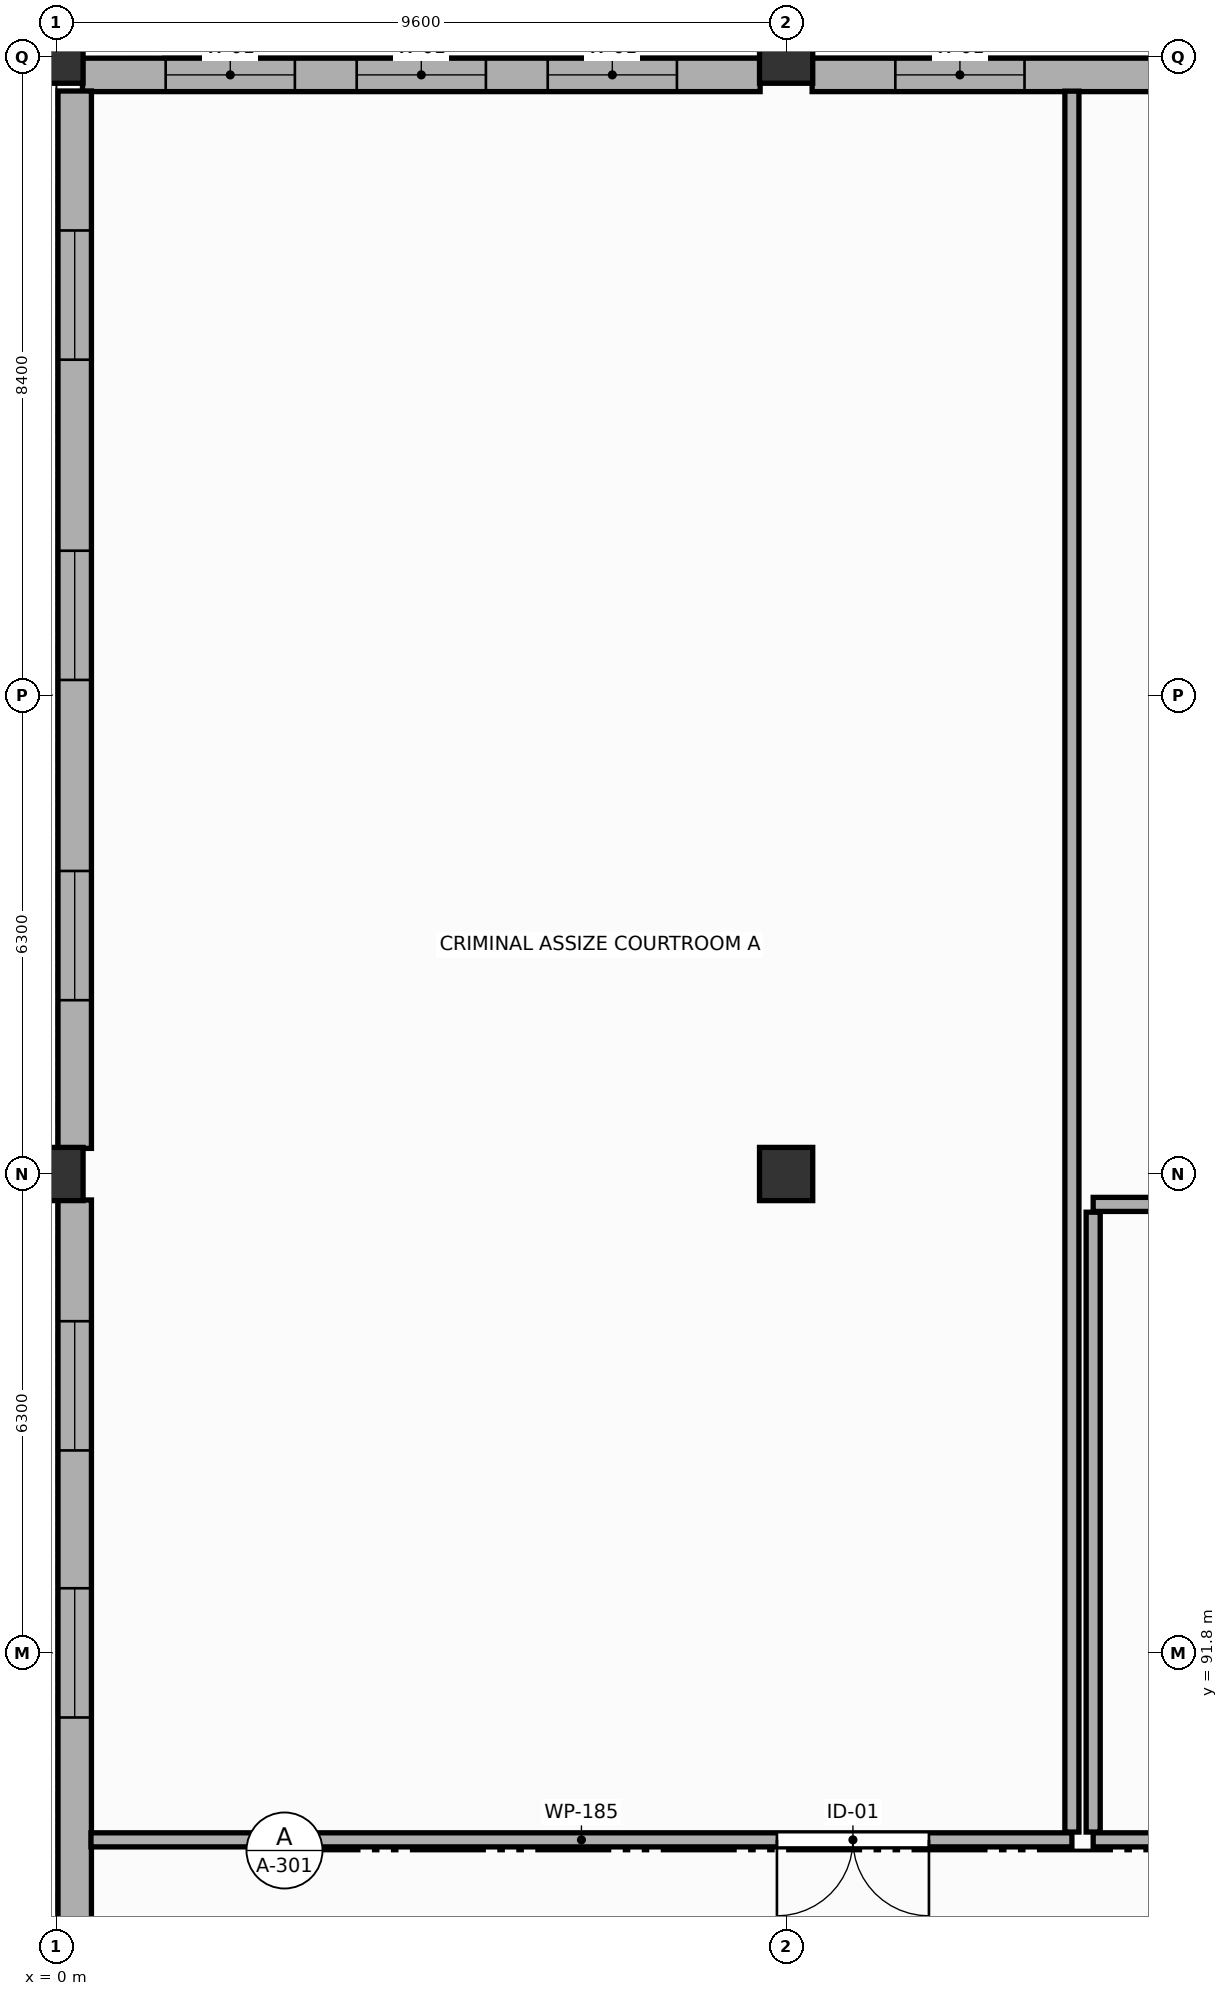
"""IFC4 building model, lengths in metres.
Left out: names, types, materials, properties, quantities, classifications, styles, units other than length and angle.
Written with IfcOpenShell. Run it as: python <this file> out.ifc"""

import sys

from ifc_helpers import new_model, si_unit, direction, frame, frame_2d, origin, origin_2d, place, context, subcontext, project, spatial, rectangle, extrude, element, fill, save


model = new_model("IFC4")
c1 = context("Model", 3, precision=1e-05, world=origin(), true_north=direction((0.0, 1.0)))
c2 = subcontext(c1, "Body", "Model", "MODEL_VIEW")
j1 = project(units=[si_unit("LENGTHUNIT", "METRE"), si_unit("PLANEANGLEUNIT", "RADIAN")], contexts=[c1])
p1 = place(None, origin())
s1 = spatial("IfcSite", under=j1, at=p1, CompositionType="ELEMENT")
p2 = place(p1, origin())
s2 = spatial("IfcBuilding", under=s1, at=p2, CompositionType="ELEMENT")
p3 = place(p2, frame((0.0, 0.0, 9.9)))
s3 = spatial("IfcBuildingStorey", under=s2, at=p3, CompositionType="ELEMENT", Elevation=9.9)
for number, where, z_axis, x_axis in (
    (1, (0.0, 98.1, 0.0), (0.0, 0.0, 1.0), (1.0, 0.0, 0.0)),
    (2, (0.0, 112.8, 0.0), (0.0, 0.0, 1.0), (1.0, 0.0, 0.0)),
    (3, (9.6, 98.1, 0.0), (0.0, 0.0, 1.0), (1.0, 0.0, 0.0)),
    (4, (9.6, 112.8, 0.0), (0.0, 0.0, 1.0), (1.0, 0.0, 0.0)),
):
    element("IfcColumn", number, at=place(p3, frame(where, z_axis=z_axis, x_axis=x_axis)), inside=s3, PredefinedType="COLUMN", context=c2, shape_type="SweptSolid", body=[
        extrude(rectangle(XDim=0.7, YDim=0.7, at=origin_2d()), origin(), (0.0, 0.0, 1.0), 4.5),
    ])
p4 = place(p3, frame((0.342, 112.56, 0.0), z_axis=(0.0, 0.0, 1.0), x_axis=(1.0, 0.0, 0.0)))
e5 = element("IfcWall", 5, at=p4, inside=s3, PredefinedType="STANDARD", context=c2, shape_type="SweptSolid", body=[
    extrude(rectangle(XDim=8.916, YDim=0.44, at=frame_2d((4.458, 0.0))), origin(), (0.0, 0.0, 1.0), 3.33),
])
p5 = place(p4, frame((1.095, 0.0, 0.85)))
e6 = element("IfcOpeningElement", 6, at=p5, cuts=e5, PredefinedType="OPENING", context=c2, shape_type="SweptSolid", body=[
    extrude(rectangle(XDim=1.7, YDim=2.3, at=frame_2d((0.85, 1.15))), frame((0.0, 0.23, 0.0), z_axis=(0.0, -1.0, 0.0), x_axis=(1.0, 0.0, 0.0)), (0.0, 0.0, 1.0), 0.46),
])
p6 = place(p4, frame((3.608, 0.0, 0.85)))
e7 = element("IfcOpeningElement", 7, at=p6, cuts=e5, PredefinedType="OPENING", context=c2, shape_type="SweptSolid", body=[
    extrude(rectangle(XDim=1.7, YDim=2.3, at=frame_2d((0.85, 1.15))), frame((0.0, 0.23, 0.0), z_axis=(0.0, -1.0, 0.0), x_axis=(1.0, 0.0, 0.0)), (0.0, 0.0, 1.0), 0.46),
])
p7 = place(p4, frame((6.121, 0.0, 0.85)))
e8 = element("IfcOpeningElement", 8, at=p7, cuts=e5, PredefinedType="OPENING", context=c2, shape_type="SweptSolid", body=[
    extrude(rectangle(XDim=1.7, YDim=2.3, at=frame_2d((0.85, 1.15))), frame((0.0, 0.23, 0.0), z_axis=(0.0, -1.0, 0.0), x_axis=(1.0, 0.0, 0.0)), (0.0, 0.0, 1.0), 0.46),
])
p8 = place(p3, frame((9.942, 112.56, 0.0), z_axis=(0.0, 0.0, 1.0), x_axis=(1.0, 0.0, 0.0)))
e9 = element("IfcWall", 9, at=p8, inside=s3, PredefinedType="STANDARD", context=c2, shape_type="SweptSolid", body=[
    extrude(rectangle(XDim=8.916, YDim=0.44, at=frame_2d((4.458, 0.0))), origin(), (0.0, 0.0, 1.0), 3.33),
])
p9 = place(p8, frame((1.095, 0.0, 0.85)))
e10 = element("IfcOpeningElement", 10, at=p9, cuts=e9, PredefinedType="OPENING", context=c2, shape_type="SweptSolid", body=[
    extrude(rectangle(XDim=1.7, YDim=2.3, at=frame_2d((0.85, 1.15))), frame((0.0, 0.23, 0.0), z_axis=(0.0, -1.0, 0.0), x_axis=(1.0, 0.0, 0.0)), (0.0, 0.0, 1.0), 0.46),
])
p10 = place(p8, frame((6.121, 0.0, 0.85)))
e11 = element("IfcOpeningElement", 11, at=p10, cuts=e9, PredefinedType="OPENING", context=c2, shape_type="SweptSolid", body=[
    extrude(rectangle(XDim=1.7, YDim=2.3, at=frame_2d((0.85, 1.15))), frame((0.0, 0.23, 0.0), z_axis=(0.0, -1.0, 0.0), x_axis=(1.0, 0.0, 0.0)), (0.0, 0.0, 1.0), 0.46),
])
p11 = place(p3, frame((0.24, 85.837, 0.0), z_axis=(0.0, 0.0, 1.0), x_axis=(0.0, 1.0, 0.0)))
e12 = element("IfcWall", 12, at=p11, inside=s3, PredefinedType="STANDARD", context=c2, shape_type="SweptSolid", body=[
    extrude(rectangle(XDim=11.921, YDim=0.44, at=frame_2d((5.96, 0.0))), origin(), (0.0, 0.0, 1.0), 3.33),
])
p12 = place(p11, frame((5.113, 0.0, 0.85)))
e13 = element("IfcOpeningElement", 13, at=p12, cuts=e12, PredefinedType="OPENING", context=c2, shape_type="SweptSolid", body=[
    extrude(rectangle(XDim=1.7, YDim=2.3, at=frame_2d((0.85, 1.15))), frame((0.0, 0.23, 0.0), z_axis=(0.0, -1.0, 0.0), x_axis=(1.0, 0.0, 0.0)), (0.0, 0.0, 1.0), 0.46),
])
p13 = place(p11, frame((8.626, 0.0, 0.85)))
e14 = element("IfcOpeningElement", 14, at=p13, cuts=e12, PredefinedType="OPENING", context=c2, shape_type="SweptSolid", body=[
    extrude(rectangle(XDim=1.7, YDim=2.3, at=frame_2d((0.85, 1.15))), frame((0.0, 0.23, 0.0), z_axis=(0.0, -1.0, 0.0), x_axis=(1.0, 0.0, 0.0)), (0.0, 0.0, 1.0), 0.46),
])
p14 = place(p3, frame((0.24, 98.437, 0.0), z_axis=(0.0, 0.0, 1.0), x_axis=(0.0, 1.0, 0.0)))
e15 = element("IfcWall", 15, at=p14, inside=s3, PredefinedType="STANDARD", context=c2, shape_type="SweptSolid", body=[
    extrude(rectangle(XDim=13.911, YDim=0.44, at=frame_2d((6.956, 0.0))), origin(), (0.0, 0.0, 1.0), 3.33),
])
p15 = place(p14, frame((1.95, 0.0, 0.85)))
e16 = element("IfcOpeningElement", 16, at=p15, cuts=e15, PredefinedType="OPENING", context=c2, shape_type="SweptSolid", body=[
    extrude(rectangle(XDim=1.7, YDim=2.3, at=frame_2d((0.85, 1.15))), frame((0.0, 0.23, 0.0), z_axis=(0.0, -1.0, 0.0), x_axis=(1.0, 0.0, 0.0)), (0.0, 0.0, 1.0), 0.46),
])
p16 = place(p14, frame((6.163, 0.0, 0.85)))
e17 = element("IfcOpeningElement", 17, at=p16, cuts=e15, PredefinedType="OPENING", context=c2, shape_type="SweptSolid", body=[
    extrude(rectangle(XDim=1.7, YDim=2.3, at=frame_2d((0.85, 1.15))), frame((0.0, 0.23, 0.0), z_axis=(0.0, -1.0, 0.0), x_axis=(1.0, 0.0, 0.0)), (0.0, 0.0, 1.0), 0.46),
])
p17 = place(p14, frame((10.376, 0.0, 0.85)))
e18 = element("IfcOpeningElement", 18, at=p17, cuts=e15, PredefinedType="OPENING", context=c2, shape_type="SweptSolid", body=[
    extrude(rectangle(XDim=1.7, YDim=2.3, at=frame_2d((0.85, 1.15))), frame((0.0, 0.23, 0.0), z_axis=(0.0, -1.0, 0.0), x_axis=(1.0, 0.0, 0.0)), (0.0, 0.0, 1.0), 0.46),
])
p18 = place(p3, frame((13.36, 89.34, 0.0), z_axis=(0.0, 0.0, 1.0), x_axis=(-1.0, 0.0, 0.0)))
e19 = element("IfcWall", 19, at=p18, inside=s3, PredefinedType="PARTITIONING", context=c2, shape_type="SweptSolid", body=[
    extrude(rectangle(XDim=12.906, YDim=0.185, at=frame_2d((6.453, 0.0))), origin(), (0.0, 0.0, 1.0), 3.38),
])
p19 = place(p18, frame((1.881, 0.0, 0.0)))
e20 = element("IfcOpeningElement", 20, at=p19, cuts=e19, PredefinedType="OPENING", context=c2, shape_type="SweptSolid", body=[
    extrude(rectangle(XDim=2.0, YDim=2.5, at=frame_2d((1.0, 1.25))), frame((0.0, 0.103, 0.0), z_axis=(0.0, -1.0, 0.0), x_axis=(1.0, 0.0, 0.0)), (0.0, 0.0, 1.0), 0.205),
])
p20 = place(p3, frame((13.36, 112.346, 0.0), z_axis=(0.0, 0.0, 1.0), x_axis=(0.0, -1.0, 0.0)))
e21 = element("IfcWall", 21, at=p20, inside=s3, PredefinedType="PARTITIONING", context=c2, shape_type="SweptSolid", body=[
    extrude(rectangle(XDim=22.904, YDim=0.185, at=frame_2d((11.452, 0.0))), origin(), (0.0, 0.0, 1.0), 3.58),
])
p21 = place(p3, frame((13.64, 97.7, 0.0), z_axis=(0.0, 0.0, 1.0), x_axis=(1.0, 0.0, 0.0)))
e22 = element("IfcWall", 22, at=p21, inside=s3, PredefinedType="PARTITIONING", context=c2, shape_type="SweptSolid", body=[
    extrude(rectangle(XDim=12.42, YDim=0.185, at=frame_2d((6.21, 0.0))), origin(), (0.0, 0.0, 1.0), 3.33),
])
p22 = place(p3, frame((26.06, 89.34, 0.0), z_axis=(0.0, 0.0, 1.0), x_axis=(-1.0, 0.0, 0.0)))
e23 = element("IfcWall", 23, at=p22, inside=s3, PredefinedType="PARTITIONING", context=c2, shape_type="SweptSolid", body=[
    extrude(rectangle(XDim=12.42, YDim=0.185, at=frame_2d((6.21, 0.0))), origin(), (0.0, 0.0, 1.0), 3.38),
])
p23 = place(p22, frame((1.808, 0.0, 0.0)))
e24 = element("IfcOpeningElement", 24, at=p23, cuts=e23, PredefinedType="OPENING", context=c2, shape_type="SweptSolid", body=[
    extrude(rectangle(XDim=2.0, YDim=2.5, at=frame_2d((1.0, 1.25))), frame((0.0, 0.103, 0.0), z_axis=(0.0, -1.0, 0.0), x_axis=(1.0, 0.0, 0.0)), (0.0, 0.0, 1.0), 0.205),
])
p24 = place(p3, frame((13.64, 89.442, 0.0), z_axis=(0.0, 0.0, 1.0), x_axis=(0.0, 1.0, 0.0)))
e25 = element("IfcWall", 25, at=p24, inside=s3, PredefinedType="PARTITIONING", context=c2, shape_type="SweptSolid", body=[
    extrude(rectangle(XDim=8.155, YDim=0.185, at=frame_2d((4.078, 0.0))), origin(), (0.0, 0.0, 1.0), 3.63),
])
p25 = place(p5, origin())
e26 = element("IfcWindow", 26, at=p25, inside=s3, PartitioningType="SINGLE_PANEL", PredefinedType="WINDOW", context=c2, shape_type="SweptSolid", body=[
    extrude(rectangle(XDim=1.7, YDim=2.3, at=frame_2d((0.85, 1.15))), frame((0.0, 0.03, 0.0), z_axis=(0.0, -1.0, 0.0), x_axis=(1.0, 0.0, 0.0)), (0.0, 0.0, 1.0), 0.06),
])
fill(e6, e26)
p26 = place(p6, origin())
e27 = element("IfcWindow", 27, at=p26, inside=s3, PartitioningType="SINGLE_PANEL", PredefinedType="WINDOW", context=c2, shape_type="SweptSolid", body=[
    extrude(rectangle(XDim=1.7, YDim=2.3, at=frame_2d((0.85, 1.15))), frame((0.0, 0.03, 0.0), z_axis=(0.0, -1.0, 0.0), x_axis=(1.0, 0.0, 0.0)), (0.0, 0.0, 1.0), 0.06),
])
fill(e7, e27)
p27 = place(p7, origin())
e28 = element("IfcWindow", 28, at=p27, inside=s3, PartitioningType="SINGLE_PANEL", PredefinedType="WINDOW", context=c2, shape_type="SweptSolid", body=[
    extrude(rectangle(XDim=1.7, YDim=2.3, at=frame_2d((0.85, 1.15))), frame((0.0, 0.03, 0.0), z_axis=(0.0, -1.0, 0.0), x_axis=(1.0, 0.0, 0.0)), (0.0, 0.0, 1.0), 0.06),
])
fill(e8, e28)
p28 = place(p9, origin())
e29 = element("IfcWindow", 29, at=p28, inside=s3, PartitioningType="SINGLE_PANEL", PredefinedType="WINDOW", context=c2, shape_type="SweptSolid", body=[
    extrude(rectangle(XDim=1.7, YDim=2.3, at=frame_2d((0.85, 1.15))), frame((0.0, 0.03, 0.0), z_axis=(0.0, -1.0, 0.0), x_axis=(1.0, 0.0, 0.0)), (0.0, 0.0, 1.0), 0.06),
])
fill(e10, e29)
p29 = place(p12, origin())
e30 = element("IfcWindow", 30, at=p29, inside=s3, PartitioningType="SINGLE_PANEL", PredefinedType="WINDOW", context=c2, shape_type="SweptSolid", body=[
    extrude(rectangle(XDim=1.7, YDim=2.3, at=frame_2d((0.85, 1.15))), frame((0.0, 0.03, 0.0), z_axis=(0.0, -1.0, 0.0), x_axis=(1.0, 0.0, 0.0)), (0.0, 0.0, 1.0), 0.06),
])
fill(e13, e30)
p30 = place(p13, origin())
e31 = element("IfcWindow", 31, at=p30, inside=s3, PartitioningType="SINGLE_PANEL", PredefinedType="WINDOW", context=c2, shape_type="SweptSolid", body=[
    extrude(rectangle(XDim=1.7, YDim=2.3, at=frame_2d((0.85, 1.15))), frame((0.0, 0.03, 0.0), z_axis=(0.0, -1.0, 0.0), x_axis=(1.0, 0.0, 0.0)), (0.0, 0.0, 1.0), 0.06),
])
fill(e14, e31)
p31 = place(p15, origin())
e32 = element("IfcWindow", 32, at=p31, inside=s3, PartitioningType="SINGLE_PANEL", PredefinedType="WINDOW", context=c2, shape_type="SweptSolid", body=[
    extrude(rectangle(XDim=1.7, YDim=2.3, at=frame_2d((0.85, 1.15))), frame((0.0, 0.03, 0.0), z_axis=(0.0, -1.0, 0.0), x_axis=(1.0, 0.0, 0.0)), (0.0, 0.0, 1.0), 0.06),
])
fill(e16, e32)
p32 = place(p16, origin())
e33 = element("IfcWindow", 33, at=p32, inside=s3, PartitioningType="SINGLE_PANEL", PredefinedType="WINDOW", context=c2, shape_type="SweptSolid", body=[
    extrude(rectangle(XDim=1.7, YDim=2.3, at=frame_2d((0.85, 1.15))), frame((0.0, 0.03, 0.0), z_axis=(0.0, -1.0, 0.0), x_axis=(1.0, 0.0, 0.0)), (0.0, 0.0, 1.0), 0.06),
])
fill(e17, e33)
p33 = place(p17, origin())
e34 = element("IfcWindow", 34, at=p33, inside=s3, PartitioningType="SINGLE_PANEL", PredefinedType="WINDOW", context=c2, shape_type="SweptSolid", body=[
    extrude(rectangle(XDim=1.7, YDim=2.3, at=frame_2d((0.85, 1.15))), frame((0.0, 0.03, 0.0), z_axis=(0.0, -1.0, 0.0), x_axis=(1.0, 0.0, 0.0)), (0.0, 0.0, 1.0), 0.06),
])
fill(e18, e34)
p34 = place(p19, origin())
e35 = element("IfcDoor", 35, at=p34, inside=s3, OperationType="DOUBLE_DOOR_SINGLE_SWING", PredefinedType="DOOR", context=c2, shape_type="SweptSolid", body=[
    extrude(rectangle(XDim=2.0, YDim=2.5, at=frame_2d((1.0, 1.25))), frame((0.0, 0.025, 0.0), z_axis=(0.0, -1.0, 0.0), x_axis=(1.0, 0.0, 0.0)), (0.0, 0.0, 1.0), 0.05),
])
fill(e20, e35)
save(model, sys.argv[1])
